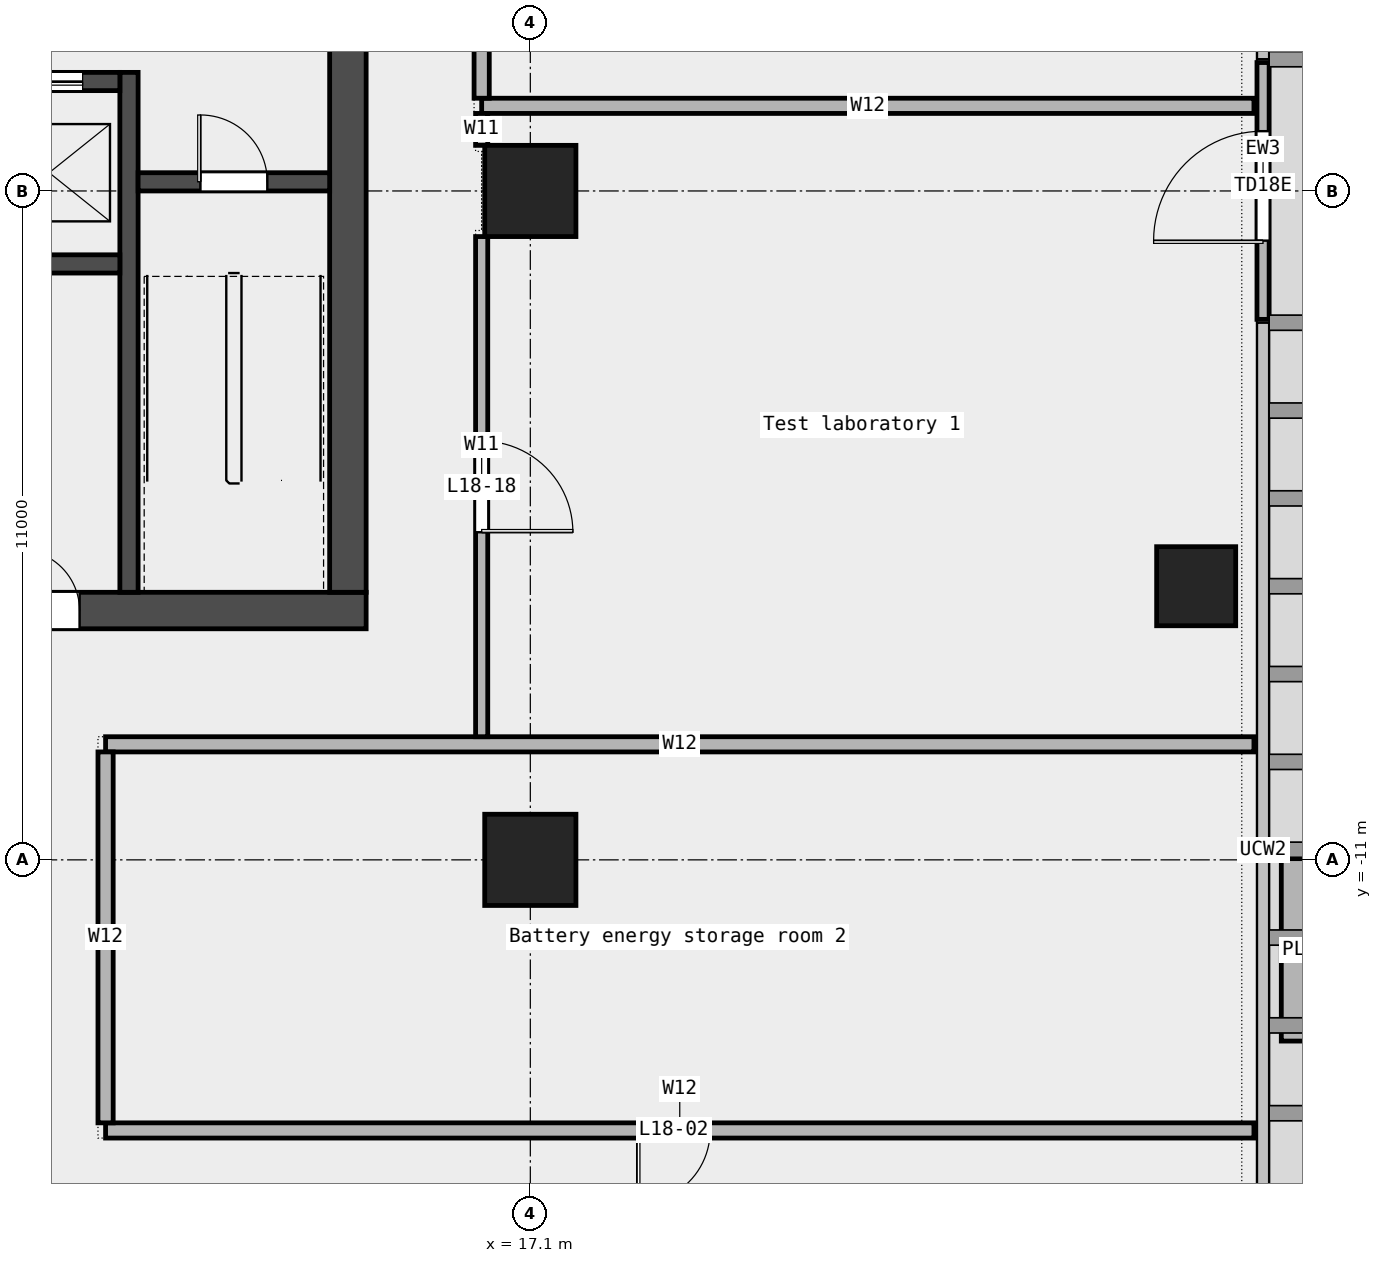
"""IFC4 building model, lengths in metres.
Left out: names, types, materials, properties, quantities, classifications, styles, units other than length and angle.
Written with IfcOpenShell. Run it as: python <this file> out.ifc"""

import sys

from ifc_helpers import new_model, si_unit, direction, frame, frame_2d, origin, origin_2d, place, context, subcontext, project, spatial, rectangle, extrude, element, fill, save


model = new_model("IFC4")
c1 = context("Model", 3, precision=1e-05, world=origin(), true_north=direction((0.0, 1.0)))
c2 = subcontext(c1, "Body", "Model", "MODEL_VIEW")
j1 = project(units=[si_unit("LENGTHUNIT", "METRE"), si_unit("PLANEANGLEUNIT", "RADIAN")], contexts=[c1])
p1 = place(None, origin())
s1 = spatial("IfcSite", under=j1, at=p1, CompositionType="ELEMENT")
p2 = place(p1, origin())
s2 = spatial("IfcBuilding", under=s1, at=p2, CompositionType="ELEMENT")
p3 = place(p2, frame((0.0, 0.0, 94.6)))
s3 = spatial("IfcBuildingStorey", under=s2, at=p3, CompositionType="ELEMENT", Elevation=94.6)
p4 = place(p3, frame((28.05, -6.5, 0.0), z_axis=(0.0, 0.0, 1.0), x_axis=(1.0, 0.0, 0.0)))
e1 = element("IfcColumn", 1, at=p4, inside=s3, PredefinedType="COLUMN", context=c2, shape_type="SweptSolid", body=[
    extrude(rectangle(XDim=1.3, YDim=1.3, at=origin_2d()), origin(), (0.0, 0.0, 1.0), 4.05),
])
for number, where, z_axis, x_axis in (
    (2, (17.1, -11.0, 0.0), (0.0, 0.0, 1.0), (1.0, 0.0, 0.0)),
    (3, (17.1, 0.0, 0.0), (0.0, 0.0, 1.0), (1.0, 0.0, 0.0)),
):
    element("IfcColumn", number, at=place(p3, frame(where, z_axis=z_axis, x_axis=x_axis)), inside=s3, PredefinedType="COLUMN", context=c2, shape_type="SweptSolid", body=[
        extrude(rectangle(XDim=1.5, YDim=1.5, at=origin_2d()), origin(), (0.0, 0.0, 1.0), 4.05),
    ])
p5 = place(p3, frame((29.15, -2.112, 0.0), z_axis=(0.0, 0.0, 1.0), x_axis=(0.0, 1.0, 0.0)))
e4 = element("IfcWall", 4, at=p5, inside=s3, PredefinedType="STANDARD", context=c2, shape_type="SweptSolid", body=[
    extrude(rectangle(XDim=4.223, YDim=0.2, at=frame_2d((2.112, 0.0))), origin(), (0.0, 0.0, 1.0), 4.05),
])
p6 = place(p5, frame((1.295, 0.0, 0.0)))
e5 = element("IfcOpeningElement", 5, at=p6, cuts=e4, PredefinedType="OPENING", context=c2, shape_type="SweptSolid", body=[
    extrude(rectangle(XDim=1.8, YDim=2.4, at=frame_2d((0.9, 1.2))), frame((0.0, 0.112, 0.0), z_axis=(0.0, -1.0, 0.0), x_axis=(1.0, 0.0, 0.0)), (0.0, 0.0, 1.0), 0.224),
])
p7 = place(p3, frame((29.75, -13.98, 0.0), z_axis=(0.0, 0.0, 1.0), x_axis=(0.0, 1.0, 0.0)))
e6 = element("IfcWall", 6, at=p7, inside=s3, PredefinedType="STANDARD", context=c2, shape_type="SweptSolid", body=[
    extrude(rectangle(XDim=3.0, YDim=0.6, at=frame_2d((1.5, 0.0))), origin(), (0.0, 0.0, 1.0), 0.7),
])
p8 = place(p3, frame((10.115, -15.45, 0.0), z_axis=(0.0, 0.0, 1.0), x_axis=(1.0, 0.0, 0.0)))
e7 = element("IfcWall", 7, at=p8, inside=s3, PredefinedType="PARTITIONING", context=c2, shape_type="SweptSolid", body=[
    extrude(rectangle(XDim=18.885, YDim=0.25, at=frame_2d((9.442, 0.0))), origin(), (0.0, 0.0, 1.0), 4.05),
])
p9 = place(p8, frame((8.742, 0.0, 0.0)))
e8 = element("IfcOpeningElement", 8, at=p9, cuts=e7, PredefinedType="OPENING", context=c2, shape_type="SweptSolid", body=[
    extrude(rectangle(XDim=1.2, YDim=2.1, at=frame_2d((0.6, 1.05))), frame((0.0, 0.137, 0.0), z_axis=(0.0, -1.0, 0.0), x_axis=(1.0, 0.0, 0.0)), (0.0, 0.0, 1.0), 0.274),
])
p10 = place(p3, frame((10.115, -9.1, 0.0), z_axis=(0.0, 0.0, 1.0), x_axis=(1.0, 0.0, 0.0)))
e9 = element("IfcWall", 9, at=p10, inside=s3, PredefinedType="PARTITIONING", context=c2, shape_type="SweptSolid", body=[
    extrude(rectangle(XDim=18.885, YDim=0.25, at=frame_2d((9.442, 0.0))), origin(), (0.0, 0.0, 1.0), 4.05),
])
p11 = place(p3, frame((16.3, 1.4, 0.0), z_axis=(0.0, 0.0, 1.0), x_axis=(1.0, 0.0, 0.0)))
e10 = element("IfcWall", 10, at=p11, inside=s3, PredefinedType="PARTITIONING", context=c2, shape_type="SweptSolid", body=[
    extrude(rectangle(XDim=12.7, YDim=0.25, at=frame_2d((6.35, 0.0))), origin(), (0.0, 0.0, 1.0), 4.05),
])
p12 = place(p3, frame((10.115, -15.325, 0.0), z_axis=(0.0, 0.0, 1.0), x_axis=(0.0, 1.0, 0.0)))
e11 = element("IfcWall", 11, at=p12, inside=s3, PredefinedType="PARTITIONING", context=c2, shape_type="SweptSolid", body=[
    extrude(rectangle(XDim=6.1, YDim=0.25, at=frame_2d((3.05, 0.0))), origin(), (0.0, 0.0, 1.0), 4.05),
])
p13 = place(p3, frame((16.3, -8.975, 0.0), z_axis=(0.0, 0.0, 1.0), x_axis=(0.0, 1.0, 0.0)))
e12 = element("IfcWall", 12, at=p13, inside=s3, PredefinedType="PARTITIONING", context=c2, shape_type="SweptSolid", body=[
    extrude(rectangle(XDim=8.225, YDim=0.2, at=frame_2d((4.113, 0.0))), origin(), (0.0, 0.0, 1.0), 4.05),
])
p14 = place(p13, frame((3.363, 0.0, 0.0)))
e13 = element("IfcOpeningElement", 13, at=p14, cuts=e12, PredefinedType="OPENING", context=c2, shape_type="SweptSolid", body=[
    extrude(rectangle(XDim=1.5, YDim=2.1, at=frame_2d((0.75, 1.05))), frame((0.0, 0.112, 0.0), z_axis=(0.0, -1.0, 0.0), x_axis=(1.0, 0.0, 0.0)), (0.0, 0.0, 1.0), 0.224),
])
p15 = place(p3, frame((16.3, 0.75, 0.0), z_axis=(0.0, 0.0, 1.0), x_axis=(0.0, 1.0, 0.0)))
e14 = element("IfcWall", 14, at=p15, inside=s3, PredefinedType="PARTITIONING", context=c2, shape_type="SweptSolid", body=[
    extrude(rectangle(XDim=0.525, YDim=0.2, at=frame_2d((0.262, 0.0))), origin(), (0.0, 0.0, 1.0), 4.05),
])
p16 = place(p3, frame((16.3, 1.525, 0.0), z_axis=(0.0, 0.0, 1.0), x_axis=(0.0, 1.0, 0.0)))
e15 = element("IfcWall", 15, at=p16, inside=s3, PredefinedType="PARTITIONING", context=c2, shape_type="SweptSolid", body=[
    extrude(rectangle(XDim=7.85, YDim=0.25, at=frame_2d((3.925, 0.0))), origin(), (0.0, 0.0, 1.0), 4.05),
])
p17 = place(p16, frame((2.538, 0.0, 0.0)))
e16 = element("IfcOpeningElement", 16, at=p17, cuts=e15, PredefinedType="OPENING", context=c2, shape_type="SweptSolid", body=[
    extrude(rectangle(XDim=1.8, YDim=2.1, at=frame_2d((0.9, 1.05))), frame((0.0, 0.137, 0.0), z_axis=(0.0, -1.0, 0.0), x_axis=(1.0, 0.0, 0.0)), (0.0, 0.0, 1.0), 0.274),
])
p18 = place(p3, frame((-14.4, -6.9, 0.0), z_axis=(0.0, 0.0, 1.0), x_axis=(1.0, 0.0, 0.0)))
e17 = element("IfcWall", 17, at=p18, inside=s3, PredefinedType="SHEAR", context=c2, shape_type="SweptSolid", body=[
    extrude(rectangle(XDim=28.8, YDim=0.6, at=frame_2d((14.4, 0.0))), origin(), (0.0, 0.0, 1.0), 4.2),
])
p19 = place(p18, frame((5.462, 0.0, 0.0)))
e18 = element("IfcOpeningElement", 18, at=p19, cuts=e17, PredefinedType="OPENING", context=c2, shape_type="SweptSolid", body=[
    extrude(rectangle(XDim=1.0, YDim=2.1, at=frame_2d((0.5, 1.05))), frame((0.0, 0.312, 0.0), z_axis=(0.0, -1.0, 0.0), x_axis=(1.0, 0.0, 0.0)), (0.0, 0.0, 1.0), 0.624),
])
p20 = place(p18, frame((10.425, 0.0, 0.0)))
e19 = element("IfcOpeningElement", 19, at=p20, cuts=e17, PredefinedType="OPENING", context=c2, shape_type="SweptSolid", body=[
    extrude(rectangle(XDim=1.2, YDim=2.1, at=frame_2d((0.6, 1.05))), frame((0.0, 0.312, 0.0), z_axis=(0.0, -1.0, 0.0), x_axis=(1.0, 0.0, 0.0)), (0.0, 0.0, 1.0), 0.624),
])
p21 = place(p18, frame((15.025, 0.0, 0.0)))
e20 = element("IfcOpeningElement", 20, at=p21, cuts=e17, PredefinedType="OPENING", context=c2, shape_type="SweptSolid", body=[
    extrude(rectangle(XDim=1.0, YDim=2.1, at=frame_2d((0.5, 1.05))), frame((0.0, 0.312, 0.0), z_axis=(0.0, -1.0, 0.0), x_axis=(1.0, 0.0, 0.0)), (0.0, 0.0, 1.0), 0.624),
])
p22 = place(p18, frame((18.75, 0.0, 0.0)))
e21 = element("IfcOpeningElement", 21, at=p22, cuts=e17, PredefinedType="OPENING", context=c2, shape_type="SweptSolid", body=[
    extrude(rectangle(XDim=1.8, YDim=2.1, at=frame_2d((0.9, 1.05))), frame((0.0, 0.312, 0.0), z_axis=(0.0, -1.0, 0.0), x_axis=(1.0, 0.0, 0.0)), (0.0, 0.0, 1.0), 0.624),
])
p23 = place(p18, frame((23.087, 0.0, 0.0)))
e22 = element("IfcOpeningElement", 22, at=p23, cuts=e17, PredefinedType="OPENING", context=c2, shape_type="SweptSolid", body=[
    extrude(rectangle(XDim=1.0, YDim=2.1, at=frame_2d((0.5, 1.05))), frame((0.0, 0.312, 0.0), z_axis=(0.0, -1.0, 0.0), x_axis=(1.0, 0.0, 0.0)), (0.0, 0.0, 1.0), 0.624),
])
p24 = place(p3, frame((14.1, -6.6, 0.0), z_axis=(0.0, 0.0, 1.0), x_axis=(0.0, 1.0, 0.0)))
e23 = element("IfcWall", 23, at=p24, inside=s3, PredefinedType="SHEAR", context=c2, shape_type="SweptSolid", body=[
    extrude(rectangle(XDim=19.5, YDim=0.6, at=frame_2d((9.75, 0.0))), origin(), (0.0, 0.0, 1.0), 4.2),
])
p25 = place(p24, frame((9.3, 0.0, 0.0)))
e24 = element("IfcOpeningElement", 24, at=p25, cuts=e23, PredefinedType="OPENING", context=c2, shape_type="SweptSolid", body=[
    extrude(rectangle(XDim=1.8, YDim=2.1, at=frame_2d((0.9, 1.05))), frame((0.0, 0.312, 0.0), z_axis=(0.0, -1.0, 0.0), x_axis=(1.0, 0.0, 0.0)), (0.0, 0.0, 1.0), 0.624),
])
p26 = place(p3, frame((10.5, -6.6, 0.0), z_axis=(0.0, 0.0, 1.0), x_axis=(0.0, 1.0, 0.0)))
e25 = element("IfcWall", 25, at=p26, inside=s3, PredefinedType="SHEAR", context=c2, shape_type="SweptSolid", body=[
    extrude(rectangle(XDim=8.55, YDim=0.3, at=frame_2d((4.275, 0.0))), origin(), (0.0, 0.0, 1.0), 4.2),
])
p27 = place(p3, frame((10.65, 0.15, 0.0), z_axis=(0.0, 0.0, 1.0), x_axis=(1.0, 0.0, 0.0)))
e26 = element("IfcWall", 26, at=p27, inside=s3, PredefinedType="SOLIDWALL", context=c2, shape_type="SweptSolid", body=[
    extrude(rectangle(XDim=3.15, YDim=0.3, at=frame_2d((1.575, 0.0))), origin(), (0.0, 0.0, 1.0), 4.2),
])
p28 = place(p27, frame((1.025, 0.0, 0.0)))
e27 = element("IfcOpeningElement", 27, at=p28, cuts=e26, PredefinedType="OPENING", context=c2, shape_type="SweptSolid", body=[
    extrude(rectangle(XDim=1.1, YDim=2.1, at=frame_2d((0.55, 1.05))), frame((0.0, 0.162, 0.0), z_axis=(0.0, -1.0, 0.0), x_axis=(1.0, 0.0, 0.0)), (0.0, 0.0, 1.0), 0.324),
])
p29 = place(p3, frame((-10.35, -1.2, 0.0), z_axis=(0.0, 0.0, 1.0), x_axis=(1.0, 0.0, 0.0)))
e28 = element("IfcWall", 28, at=p29, inside=s3, PredefinedType="SOLIDWALL", context=c2, shape_type="SweptSolid", body=[
    extrude(rectangle(XDim=20.7, YDim=0.3, at=frame_2d((10.35, 0.0))), origin(), (0.0, 0.0, 1.0), 4.2),
])
p30 = place(p3, frame((-10.35, 1.8, 0.0), z_axis=(0.0, 0.0, 1.0), x_axis=(1.0, 0.0, 0.0)))
e29 = element("IfcWall", 29, at=p30, inside=s3, PredefinedType="SOLIDWALL", context=c2, shape_type="SweptSolid", body=[
    extrude(rectangle(XDim=20.7, YDim=0.3, at=frame_2d((10.35, 0.0))), origin(), (0.0, 0.0, 1.0), 4.2),
])
p31 = place(p30, frame((0.512, 0.0, 0.0)))
e30 = element("IfcOpeningElement", 30, at=p31, cuts=e29, PredefinedType="OPENING", context=c2, shape_type="SweptSolid", body=[
    extrude(rectangle(XDim=1.3, YDim=2.1, at=frame_2d((0.65, 1.05))), frame((0.0, 0.162, 0.0), z_axis=(0.0, -1.0, 0.0), x_axis=(1.0, 0.0, 0.0)), (0.0, 0.0, 1.0), 0.324),
])
p32 = place(p30, frame((5.863, 0.0, 0.0)))
e31 = element("IfcOpeningElement", 31, at=p32, cuts=e29, PredefinedType="OPENING", context=c2, shape_type="SweptSolid", body=[
    extrude(rectangle(XDim=1.1, YDim=2.1, at=frame_2d((0.55, 1.05))), frame((0.0, 0.162, 0.0), z_axis=(0.0, -1.0, 0.0), x_axis=(1.0, 0.0, 0.0)), (0.0, 0.0, 1.0), 0.324),
])
p33 = place(p30, frame((8.488, 0.0, 0.0)))
e32 = element("IfcOpeningElement", 32, at=p33, cuts=e29, PredefinedType="OPENING", context=c2, shape_type="SweptSolid", body=[
    extrude(rectangle(XDim=1.1, YDim=2.1, at=frame_2d((0.55, 1.05))), frame((0.0, 0.162, 0.0), z_axis=(0.0, -1.0, 0.0), x_axis=(1.0, 0.0, 0.0)), (0.0, 0.0, 1.0), 0.324),
])
p34 = place(p30, frame((11.113, 0.0, 0.0)))
e33 = element("IfcOpeningElement", 33, at=p34, cuts=e29, PredefinedType="OPENING", context=c2, shape_type="SweptSolid", body=[
    extrude(rectangle(XDim=1.1, YDim=2.1, at=frame_2d((0.55, 1.05))), frame((0.0, 0.162, 0.0), z_axis=(0.0, -1.0, 0.0), x_axis=(1.0, 0.0, 0.0)), (0.0, 0.0, 1.0), 0.324),
])
p35 = place(p30, frame((13.738, 0.0, 0.0)))
e34 = element("IfcOpeningElement", 34, at=p35, cuts=e29, PredefinedType="OPENING", context=c2, shape_type="SweptSolid", body=[
    extrude(rectangle(XDim=1.1, YDim=2.1, at=frame_2d((0.55, 1.05))), frame((0.0, 0.162, 0.0), z_axis=(0.0, -1.0, 0.0), x_axis=(1.0, 0.0, 0.0)), (0.0, 0.0, 1.0), 0.324),
])
p36 = place(p30, frame((16.363, 0.0, 0.0)))
e35 = element("IfcOpeningElement", 35, at=p36, cuts=e29, PredefinedType="OPENING", context=c2, shape_type="SweptSolid", body=[
    extrude(rectangle(XDim=1.1, YDim=2.1, at=frame_2d((0.55, 1.05))), frame((0.0, 0.162, 0.0), z_axis=(0.0, -1.0, 0.0), x_axis=(1.0, 0.0, 0.0)), (0.0, 0.0, 1.0), 0.324),
])
p37 = place(p30, frame((18.988, 0.0, 0.0)))
e36 = element("IfcOpeningElement", 36, at=p37, cuts=e29, PredefinedType="OPENING", context=c2, shape_type="SweptSolid", body=[
    extrude(rectangle(XDim=1.1, YDim=2.1, at=frame_2d((0.55, 1.05))), frame((0.0, 0.162, 0.0), z_axis=(0.0, -1.0, 0.0), x_axis=(1.0, 0.0, 0.0)), (0.0, 0.0, 1.0), 0.324),
])
p38 = place(p6, origin())
e37 = element("IfcDoor", 37, at=p38, inside=s3, OperationType="DOUBLE_DOOR_SINGLE_SWING", PredefinedType="DOOR", context=c2, shape_type="SweptSolid", body=[
    extrude(rectangle(XDim=1.8, YDim=2.4, at=frame_2d((0.9, 1.2))), frame((0.0, 0.025, 0.0), z_axis=(0.0, -1.0, 0.0), x_axis=(1.0, 0.0, 0.0)), (0.0, 0.0, 1.0), 0.05),
])
fill(e5, e37)
p39 = place(p9, origin())
e38 = element("IfcDoor", 38, at=p39, inside=s3, OperationType="SINGLE_SWING_RIGHT", PredefinedType="DOOR", context=c2, shape_type="SweptSolid", body=[
    extrude(rectangle(XDim=1.2, YDim=2.1, at=frame_2d((0.6, 1.05))), frame((0.0, 0.025, 0.0), z_axis=(0.0, -1.0, 0.0), x_axis=(1.0, 0.0, 0.0)), (0.0, 0.0, 1.0), 0.05),
])
fill(e8, e38)
p40 = place(p14, origin())
e39 = element("IfcDoor", 39, at=p40, inside=s3, OperationType="DOUBLE_DOOR_SINGLE_SWING", PredefinedType="DOOR", context=c2, shape_type="SweptSolid", body=[
    extrude(rectangle(XDim=1.5, YDim=2.1, at=frame_2d((0.75, 1.05))), frame((0.0, 0.025, 0.0), z_axis=(0.0, -1.0, 0.0), x_axis=(1.0, 0.0, 0.0)), (0.0, 0.0, 1.0), 0.05),
])
fill(e13, e39)
p41 = place(p28, origin())
e40 = element("IfcDoor", 40, at=p41, inside=s3, OperationType="SINGLE_SWING_RIGHT", PredefinedType="DOOR", context=c2, shape_type="SweptSolid", body=[
    extrude(rectangle(XDim=1.1, YDim=2.1, at=frame_2d((0.55, 1.05))), frame((0.0, 0.025, 0.0), z_axis=(0.0, -1.0, 0.0), x_axis=(1.0, 0.0, 0.0)), (0.0, 0.0, 1.0), 0.05),
])
fill(e27, e40)
p42 = place(p37, origin())
e41 = element("IfcDoor", 41, at=p42, inside=s3, OperationType="DOUBLE_DOOR_SLIDING", PredefinedType="DOOR", context=c2, shape_type="SweptSolid", body=[
    extrude(rectangle(XDim=1.1, YDim=2.1, at=frame_2d((0.55, 1.05))), frame((0.0, 0.025, 0.0), z_axis=(0.0, -1.0, 0.0), x_axis=(1.0, 0.0, 0.0)), (0.0, 0.0, 1.0), 0.05),
])
fill(e36, e41)
p43 = place(p23, origin())
e42 = element("IfcDoor", 42, at=p43, inside=s3, OperationType="SINGLE_SWING_LEFT", PredefinedType="DOOR", context=c2, shape_type="SweptSolid", body=[
    extrude(rectangle(XDim=1.0, YDim=2.1, at=frame_2d((0.5, 1.05))), frame((0.0, 0.025, 0.0), z_axis=(0.0, -1.0, 0.0), x_axis=(1.0, 0.0, 0.0)), (0.0, 0.0, 1.0), 0.05),
])
fill(e22, e42)
save(model, sys.argv[1])
